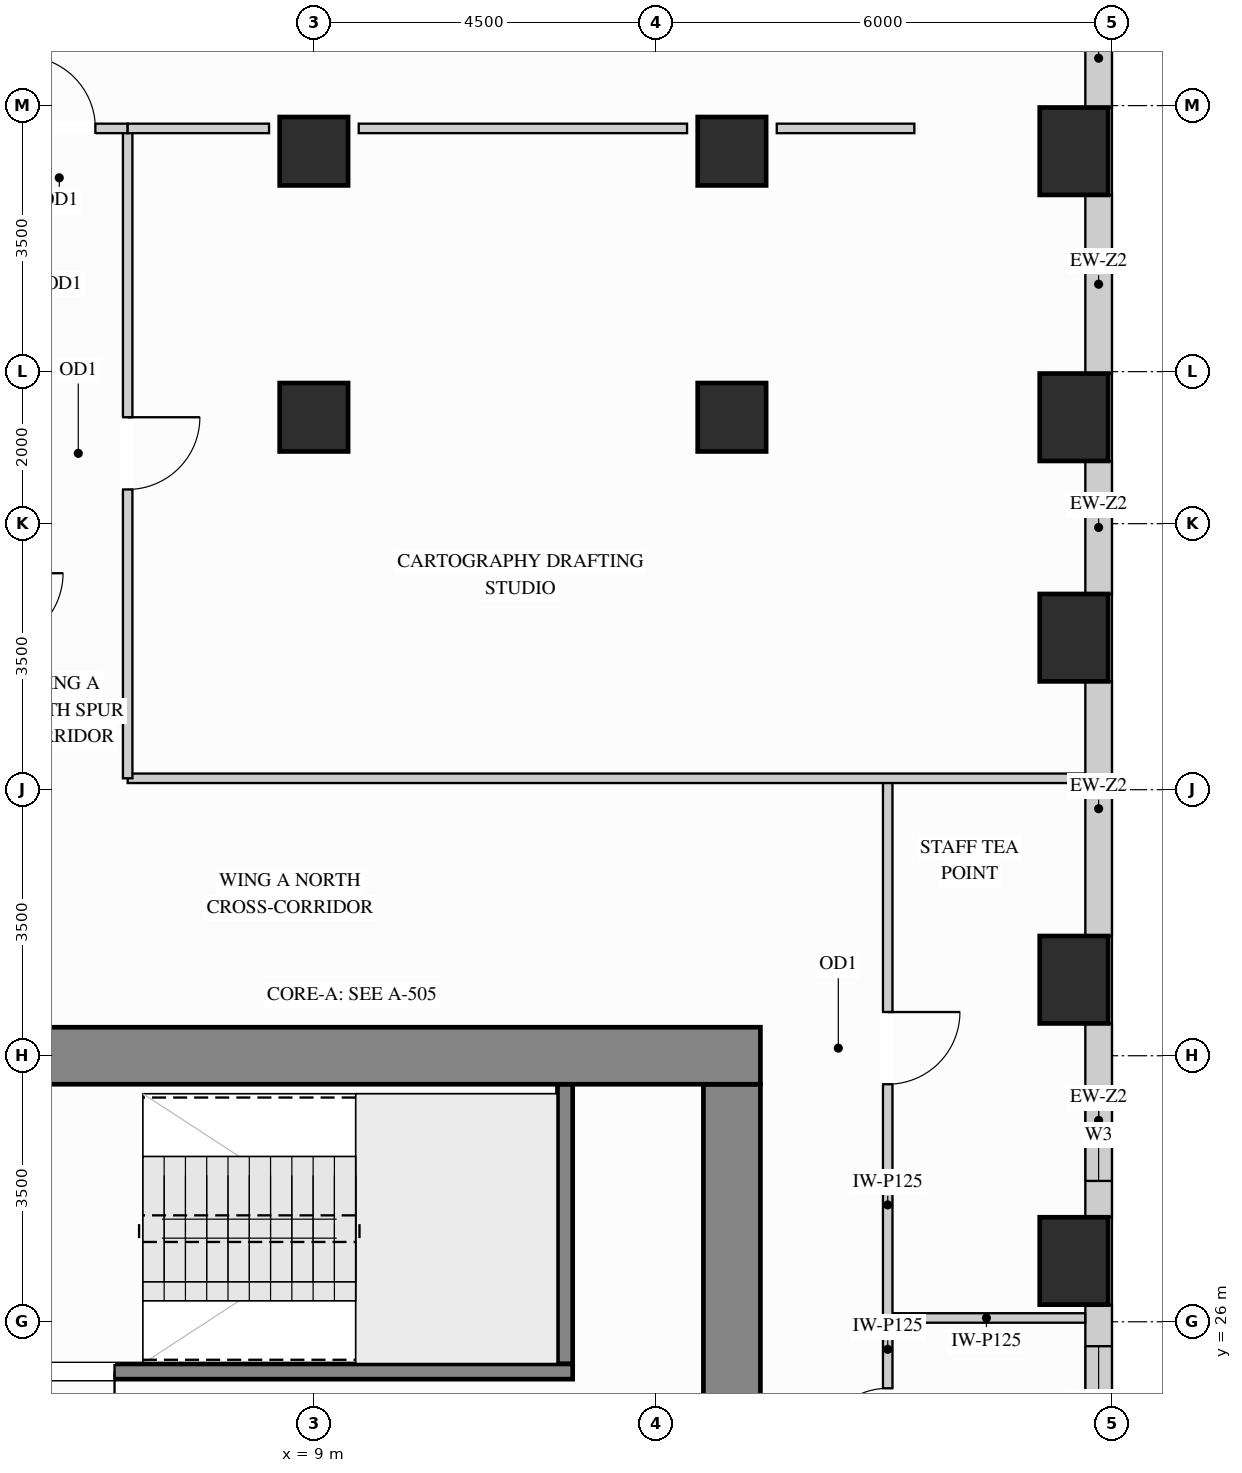
"""IFC4 building model, lengths in metres.
Left out: names, types, materials, properties, quantities, classifications, styles, units other than length and angle.
Written with IfcOpenShell. Run it as: python <this file> out.ifc"""

import sys

from ifc_helpers import new_model, si_unit, direction, frame, frame_2d, origin, origin_2d, place, context, subcontext, project, spatial, rectangle, extrude, source, transform, mapped, element, fill, save


model = new_model("IFC4")
c1 = context("Model", 3, precision=1e-05, world=origin(), true_north=direction((0.0, 1.0)))
c2 = subcontext(c1, "Body", "Model", "MODEL_VIEW")
j1 = project(units=[si_unit("LENGTHUNIT", "METRE"), si_unit("PLANEANGLEUNIT", "RADIAN")], contexts=[c1])
p1 = place(None, origin())
s1 = spatial("IfcSite", under=j1, at=p1, CompositionType="ELEMENT")
p2 = place(p1, origin())
s2 = spatial("IfcBuilding", under=s1, at=p2, CompositionType="ELEMENT")
p3 = place(p2, frame((0.0, 0.0, 135.0)))
s3 = spatial("IfcBuildingStorey", under=s2, at=p3, CompositionType="ELEMENT", Elevation=135.0)
m1 = source(origin(), c2, "Body", "SweptSolid", [
    extrude(rectangle(XDim=0.9, YDim=0.9, at=origin_2d()), origin(), (0.0, 0.0, 1.0), 3.32),
])
for number, where, z_axis, x_axis in (
    (1, (14.5, 37.9, 0.0), (0.0, 0.0, 1.0), (1.0, 0.0, 0.0)),
    (2, (14.5, 41.4, 0.0), (0.0, 0.0, 1.0), (1.0, 0.0, 0.0)),
    (3, (9.0, 37.9, 0.0), (0.0, 0.0, 1.0), (1.0, 0.0, 0.0)),
    (4, (9.0, 41.4, 0.0), (0.0, 0.0, 1.0), (1.0, 0.0, 0.0)),
):
    element("IfcColumn", number, at=place(p3, frame(where, z_axis=z_axis, x_axis=x_axis)), inside=s3, PredefinedType="COLUMN", context=c2, shape_type="MappedRepresentation", body=[
        mapped(m1, transform((0.0, 0.0, 0.0), x_axis=(1.0, 0.0, 0.0), y_axis=(0.0, 1.0, 0.0), z_axis=(0.0, 0.0, 1.0))),
    ])
m2 = source(origin(), c2, "Body", "SweptSolid", [
    extrude(rectangle(XDim=0.9, YDim=1.15, at=origin_2d()), origin(), (0.0, 0.0, 1.0), 3.32),
])
for number, where, z_axis, x_axis in (
    (5, (19.0, 26.8, 0.0), (0.0, 0.0, 1.0), (1.0, 0.0, 0.0)),
    (6, (19.0, 30.5, 0.0), (0.0, 0.0, 1.0), (1.0, 0.0, 0.0)),
    (7, (19.0, 35.0, 0.0), (0.0, 0.0, 1.0), (1.0, 0.0, 0.0)),
    (8, (19.0, 37.9, 0.0), (0.0, 0.0, 1.0), (1.0, 0.0, 0.0)),
    (9, (19.0, 41.4, 0.0), (0.0, 0.0, 1.0), (1.0, 0.0, 0.0)),
):
    element("IfcColumn", number, at=place(p3, frame(where, z_axis=z_axis, x_axis=x_axis)), inside=s3, PredefinedType="COLUMN", context=c2, shape_type="MappedRepresentation", body=[
        mapped(m2, transform((0.0, 0.0, 0.0), x_axis=(1.0, 0.0, 0.0), y_axis=(0.0, 1.0, 0.0), z_axis=(0.0, 0.0, 1.0))),
    ])
m3 = source(origin(), c2, "Body", "SweptSolid", [
    extrude(rectangle(XDim=8.245, YDim=0.75, at=frame_2d((4.123, 0.0))), origin(), (0.0, 0.0, 1.0), 3.32),
])
p4 = place(p3, frame((14.5, 20.88, 0.0), z_axis=(0.0, 0.0, 1.0), x_axis=(0.0, 1.0, 0.0)))
e10 = element("IfcWall", 10, at=p4, inside=s3, PredefinedType="SHEAR", context=c2, shape_type="MappedRepresentation", body=[
    mapped(m3, transform((0.0, 0.0, 0.0), x_axis=(1.0, 0.0, 0.0), y_axis=(0.0, 1.0, 0.0), z_axis=(0.0, 0.0, 1.0))),
])
m4 = source(origin(), c2, "Body", "SweptSolid", [
    extrude(rectangle(XDim=10.75, YDim=0.75, at=frame_2d((5.375, 0.0))), origin(), (0.0, 0.0, 1.0), 3.32),
])
p5 = place(p3, frame((4.125, 29.5, 0.0), z_axis=(0.0, 0.0, 1.0), x_axis=(1.0, 0.0, 0.0)))
e11 = element("IfcWall", 11, at=p5, inside=s3, PredefinedType="SHEAR", context=c2, shape_type="MappedRepresentation", body=[
    mapped(m4, transform((0.0, 0.0, 0.0), x_axis=(1.0, 0.0, 0.0), y_axis=(0.0, 1.0, 0.0), z_axis=(0.0, 0.0, 1.0))),
])
p6 = place(p3, frame((19.325, 23.073, 0.0), z_axis=(0.0, 0.0, 1.0), x_axis=(0.0, 1.0, 0.0)))
e12 = element("IfcWall", 12, at=p6, inside=s3, PredefinedType="SOLIDWALL", context=c2, shape_type="SweptSolid", body=[
    extrude(rectangle(XDim=3.154, YDim=0.35, at=frame_2d((1.577, 0.0))), origin(), (0.0, 0.0, 1.0), 2.459),
])
p7 = place(p6, frame((1.105, 0.0, 0.78)))
e13 = element("IfcOpeningElement", 13, at=p7, cuts=e12, PredefinedType="OPENING", context=c2, shape_type="SweptSolid", body=[
    extrude(rectangle(XDim=1.5, YDim=1.499, at=frame_2d((0.75, 0.75))), frame((0.0, 0.185, 0.0), z_axis=(0.0, -1.0, 0.0), x_axis=(1.0, 0.0, 0.0)), (0.0, 0.0, 1.0), 0.37),
])
p8 = place(p3, frame((19.325, 27.373, 0.0), z_axis=(0.0, 0.0, 1.0), x_axis=(0.0, 1.0, 0.0)))
e14 = element("IfcWall", 14, at=p8, inside=s3, PredefinedType="SOLIDWALL", context=c2, shape_type="SweptSolid", body=[
    extrude(rectangle(XDim=2.554, YDim=0.35, at=frame_2d((1.277, 0.0))), origin(), (0.0, 0.0, 1.0), 2.459),
])
p9 = place(p8, frame((0.48, 0.0, 0.78)))
e15 = element("IfcOpeningElement", 15, at=p9, cuts=e14, PredefinedType="OPENING", context=c2, shape_type="SweptSolid", body=[
    extrude(rectangle(XDim=1.2, YDim=1.499, at=frame_2d((0.6, 0.75))), frame((0.0, 0.185, 0.0), z_axis=(0.0, -1.0, 0.0), x_axis=(1.0, 0.0, 0.0)), (0.0, 0.0, 1.0), 0.37),
])
m5 = source(origin(), c2, "Body", "SweptSolid", [
    extrude(rectangle(XDim=3.354, YDim=0.35, at=frame_2d((1.677, 0.0))), origin(), (0.0, 0.0, 1.0), 2.459),
])
p10 = place(p3, frame((19.325, 31.073, 0.0), z_axis=(0.0, 0.0, 1.0), x_axis=(0.0, 1.0, 0.0)))
e16 = element("IfcWall", 16, at=p10, inside=s3, PredefinedType="SOLIDWALL", context=c2, shape_type="MappedRepresentation", body=[
    mapped(m5, transform((0.0, 0.0, 0.0), x_axis=(1.0, 0.0, 0.0), y_axis=(0.0, 1.0, 0.0), z_axis=(0.0, 0.0, 1.0))),
])
m6 = source(origin(), c2, "Body", "SweptSolid", [
    extrude(rectangle(XDim=1.754, YDim=0.35, at=frame_2d((0.877, 0.0))), origin(), (0.0, 0.0, 1.0), 2.459),
])
p11 = place(p3, frame((19.325, 35.573, 0.0), z_axis=(0.0, 0.0, 1.0), x_axis=(0.0, 1.0, 0.0)))
e17 = element("IfcWall", 17, at=p11, inside=s3, PredefinedType="SOLIDWALL", context=c2, shape_type="MappedRepresentation", body=[
    mapped(m6, transform((0.0, 0.0, 0.0), x_axis=(1.0, 0.0, 0.0), y_axis=(0.0, 1.0, 0.0), z_axis=(0.0, 0.0, 1.0))),
])
m7 = source(origin(), c2, "Body", "SweptSolid", [
    extrude(rectangle(XDim=2.354, YDim=0.35, at=frame_2d((1.177, 0.0))), origin(), (0.0, 0.0, 1.0), 2.459),
])
p12 = place(p3, frame((19.325, 38.473, 0.0), z_axis=(0.0, 0.0, 1.0), x_axis=(0.0, 1.0, 0.0)))
e18 = element("IfcWall", 18, at=p12, inside=s3, PredefinedType="SOLIDWALL", context=c2, shape_type="MappedRepresentation", body=[
    mapped(m7, transform((0.0, 0.0, 0.0), x_axis=(1.0, 0.0, 0.0), y_axis=(0.0, 1.0, 0.0), z_axis=(0.0, 0.0, 1.0))),
])
m8 = source(origin(), c2, "Body", "SweptSolid", [
    extrude(rectangle(XDim=1.179, YDim=0.35, at=frame_2d((0.59, 0.0))), origin(), (0.0, 0.0, 1.0), 3.305),
])
p13 = place(p3, frame((19.325, 41.973, 0.0), z_axis=(0.0, 0.0, 1.0), x_axis=(0.0, 1.0, 0.0)))
e19 = element("IfcWall", 19, at=p13, inside=s3, PredefinedType="SOLIDWALL", context=c2, shape_type="MappedRepresentation", body=[
    mapped(m8, transform((0.0, 0.0, 0.0), x_axis=(1.0, 0.0, 0.0), y_axis=(0.0, 1.0, 0.0), z_axis=(0.0, 0.0, 1.0))),
])
m9 = source(origin(), c2, "Body", "SweptSolid", [
    extrude(rectangle(XDim=2.598, YDim=0.125, at=frame_2d((1.299, 0.0))), origin(), (0.0, 0.0, 1.0), 3.305),
])
p14 = place(p3, frame((16.55, 26.05, 0.0), z_axis=(0.0, 0.0, 1.0), x_axis=(1.0, 0.0, 0.0)))
e20 = element("IfcWall", 20, at=p14, inside=s3, PredefinedType="PARTITIONING", context=c2, shape_type="MappedRepresentation", body=[
    mapped(m9, transform((0.0, 0.0, 0.0), x_axis=(1.0, 0.0, 0.0), y_axis=(0.0, 1.0, 0.0), z_axis=(0.0, 0.0, 1.0))),
])
p15 = place(p3, frame((16.55, 26.05, 0.0), z_axis=(0.0, 0.0, 1.0), x_axis=(0.0, 1.0, 0.0)))
e21 = element("IfcWall", 21, at=p15, inside=s3, PredefinedType="PARTITIONING", context=c2, shape_type="SweptSolid", body=[
    extrude(rectangle(XDim=7.1, YDim=0.125, at=frame_2d((3.55, 0.0))), origin(), (0.0, 0.0, 1.0), 3.305),
])
p16 = place(p15, frame((3.075, 0.0, 0.0)))
e22 = element("IfcOpeningElement", 22, at=p16, cuts=e21, PredefinedType="OPENING", context=c2, shape_type="SweptSolid", body=[
    extrude(rectangle(XDim=0.95, YDim=2.15, at=frame_2d((0.475, 1.075))), frame((0.0, 0.073, 0.0), z_axis=(0.0, -1.0, 0.0), x_axis=(1.0, 0.0, 0.0)), (0.0, 0.0, 1.0), 0.145),
])
p17 = place(p3, frame((16.55, 23.35, 0.0), z_axis=(0.0, 0.0, 1.0), x_axis=(0.0, 1.0, 0.0)))
e23 = element("IfcWall", 23, at=p17, inside=s3, PredefinedType="PARTITIONING", context=c2, shape_type="SweptSolid", body=[
    extrude(rectangle(XDim=2.7, YDim=0.125, at=frame_2d((1.35, 0.0))), origin(), (0.0, 0.0, 1.0), 3.305),
])
p18 = place(p17, frame((0.875, 0.0, 0.0)))
e24 = element("IfcOpeningElement", 24, at=p18, cuts=e23, PredefinedType="OPENING", context=c2, shape_type="SweptSolid", body=[
    extrude(rectangle(XDim=0.9, YDim=2.15, at=frame_2d((0.45, 1.075))), frame((0.0, 0.073, 0.0), z_axis=(0.0, -1.0, 0.0), x_axis=(1.0, 0.0, 0.0)), (0.0, 0.0, 1.0), 0.145),
])
m10 = source(origin(), c2, "Body", "SweptSolid", [
    extrude(rectangle(XDim=12.598, YDim=0.125, at=frame_2d((6.299, 0.0))), origin(), (0.0, 0.0, 1.0), 3.305),
])
p19 = place(p3, frame((6.55, 33.15, 0.0), z_axis=(0.0, 0.0, 1.0), x_axis=(1.0, 0.0, 0.0)))
e25 = element("IfcWall", 25, at=p19, inside=s3, PredefinedType="PARTITIONING", context=c2, shape_type="MappedRepresentation", body=[
    mapped(m10, transform((0.0, 0.0, 0.0), x_axis=(1.0, 0.0, 0.0), y_axis=(0.0, 1.0, 0.0), z_axis=(0.0, 0.0, 1.0))),
])
p20 = place(p3, frame((6.55, 33.15, 0.0), z_axis=(0.0, 0.0, 1.0), x_axis=(0.0, 1.0, 0.0)))
e26 = element("IfcWall", 26, at=p20, inside=s3, PredefinedType="PARTITIONING", context=c2, shape_type="SweptSolid", body=[
    extrude(rectangle(XDim=8.55, YDim=0.125, at=frame_2d((4.275, 0.0))), origin(), (0.0, 0.0, 1.0), 3.305),
])
p21 = place(p20, frame((3.8, 0.0, 0.0)))
e27 = element("IfcOpeningElement", 27, at=p21, cuts=e26, PredefinedType="OPENING", context=c2, shape_type="SweptSolid", body=[
    extrude(rectangle(XDim=0.95, YDim=2.15, at=frame_2d((0.475, 1.075))), frame((0.0, 0.073, 0.0), z_axis=(0.0, -1.0, 0.0), x_axis=(1.0, 0.0, 0.0)), (0.0, 0.0, 1.0), 0.145),
])
p22 = place(p3, frame((4.75, 41.7, 0.0), z_axis=(0.0, 0.0, 1.0), x_axis=(1.0, 0.0, 0.0)))
e28 = element("IfcWall", 28, at=p22, inside=s3, PredefinedType="PARTITIONING", context=c2, shape_type="SweptSolid", body=[
    extrude(rectangle(XDim=1.8, YDim=0.125, at=frame_2d((0.9, 0.0))), origin(), (0.0, 0.0, 1.0), 3.305),
])
p23 = place(p22, frame((0.425, 0.0, 0.0)))
e29 = element("IfcOpeningElement", 29, at=p23, cuts=e28, PredefinedType="OPENING", context=c2, shape_type="SweptSolid", body=[
    extrude(rectangle(XDim=0.95, YDim=2.15, at=frame_2d((0.475, 1.075))), frame((0.0, 0.073, 0.0), z_axis=(0.0, -1.0, 0.0), x_axis=(1.0, 0.0, 0.0)), (0.0, 0.0, 1.0), 0.145),
])
m11 = source(origin(), c2, "Body", "SweptSolid", [
    extrude(rectangle(XDim=1.86, YDim=0.125, at=frame_2d((0.93, 0.0))), origin(), (0.0, 0.0, 1.0), 3.305),
])
p24 = place(p3, frame((6.55, 41.7, 0.0), z_axis=(0.0, 0.0, 1.0), x_axis=(1.0, 0.0, 0.0)))
e30 = element("IfcWall", 30, at=p24, inside=s3, PredefinedType="PARTITIONING", context=c2, shape_type="MappedRepresentation", body=[
    mapped(m11, transform((0.0, 0.0, 0.0), x_axis=(1.0, 0.0, 0.0), y_axis=(0.0, 1.0, 0.0), z_axis=(0.0, 0.0, 1.0))),
])
m12 = source(origin(), c2, "Body", "SweptSolid", [
    extrude(rectangle(XDim=4.32, YDim=0.125, at=frame_2d((2.16, 0.0))), origin(), (0.0, 0.0, 1.0), 3.305),
])
p25 = place(p3, frame((9.59, 41.7, 0.0), z_axis=(0.0, 0.0, 1.0), x_axis=(1.0, 0.0, 0.0)))
e31 = element("IfcWall", 31, at=p25, inside=s3, PredefinedType="PARTITIONING", context=c2, shape_type="MappedRepresentation", body=[
    mapped(m12, transform((0.0, 0.0, 0.0), x_axis=(1.0, 0.0, 0.0), y_axis=(0.0, 1.0, 0.0), z_axis=(0.0, 0.0, 1.0))),
])
m13 = source(origin(), c2, "Body", "SweptSolid", [
    extrude(rectangle(XDim=1.81, YDim=0.125, at=frame_2d((0.905, 0.0))), origin(), (0.0, 0.0, 1.0), 3.305),
])
p26 = place(p3, frame((15.09, 41.7, 0.0), z_axis=(0.0, 0.0, 1.0), x_axis=(1.0, 0.0, 0.0)))
e32 = element("IfcWall", 32, at=p26, inside=s3, PredefinedType="PARTITIONING", context=c2, shape_type="MappedRepresentation", body=[
    mapped(m13, transform((0.0, 0.0, 0.0), x_axis=(1.0, 0.0, 0.0), y_axis=(0.0, 1.0, 0.0), z_axis=(0.0, 0.0, 1.0))),
])
m14 = source(origin(), c2, "Body", "SweptSolid", [
    extrude(rectangle(XDim=3.678, YDim=0.2, at=frame_2d((1.839, 0.0))), origin(), (0.0, 0.0, 1.0), 3.32),
])
p27 = place(p3, frame((12.305, 25.445, 0.0), z_axis=(0.0, 0.0, 1.0), x_axis=(0.0, 1.0, 0.0)))
e33 = element("IfcWall", 33, at=p27, inside=s3, PredefinedType="SHEAR", context=c2, shape_type="MappedRepresentation", body=[
    mapped(m14, transform((0.0, 0.0, 0.0), x_axis=(1.0, 0.0, 0.0), y_axis=(0.0, 1.0, 0.0), z_axis=(0.0, 0.0, 1.0))),
])
p28 = place(p3, frame((4.877, 25.345, 0.0), z_axis=(0.0, 0.0, 1.0), x_axis=(1.0, 0.0, 0.0)))
e34 = element("IfcWall", 34, at=p28, inside=s3, PredefinedType="SHEAR", context=c2, shape_type="SweptSolid", body=[
    extrude(rectangle(XDim=7.528, YDim=0.2, at=frame_2d((3.764, 0.0))), origin(), (0.0, 0.0, 1.0), 3.32),
])
p29 = place(p28, frame((0.4, 0.0, 0.0)))
e35 = element("IfcOpeningElement", 35, at=p29, cuts=e34, PredefinedType="OPENING", context=c2, shape_type="SweptSolid", body=[
    extrude(rectangle(XDim=1.1, YDim=2.15, at=frame_2d((0.55, 1.075))), frame((0.0, 0.11, 0.0), z_axis=(0.0, -1.0, 0.0), x_axis=(1.0, 0.0, 0.0)), (0.0, 0.0, 1.0), 0.22),
])
m15 = source(origin(), c2, "Body", "SweptSolid", [
    extrude(rectangle(XDim=0.95, YDim=2.15, at=frame_2d((0.475, 1.075))), frame((0.0, 0.025, 0.0), z_axis=(0.0, -1.0, 0.0), x_axis=(1.0, 0.0, 0.0)), (0.0, 0.0, 1.0), 0.05),
])
p30 = place(p16, origin())
e36 = element("IfcDoor", 36, at=p30, inside=s3, OperationType="SINGLE_SWING_RIGHT", PredefinedType="DOOR", context=c2, shape_type="MappedRepresentation", body=[
    mapped(m15, transform((0.0, 0.0, 0.0), x_axis=(1.0, 0.0, 0.0), y_axis=(0.0, 1.0, 0.0), z_axis=(0.0, 0.0, 1.0))),
])
fill(e22, e36)
p31 = place(p21, origin())
e37 = element("IfcDoor", 37, at=p31, inside=s3, OperationType="SINGLE_SWING_RIGHT", PredefinedType="DOOR", context=c2, shape_type="MappedRepresentation", body=[
    mapped(m15, transform((0.0, 0.0, 0.0), x_axis=(1.0, 0.0, 0.0), y_axis=(0.0, 1.0, 0.0), z_axis=(0.0, 0.0, 1.0))),
])
fill(e27, e37)
p32 = place(p23, origin())
e38 = element("IfcDoor", 38, at=p32, inside=s3, OperationType="SINGLE_SWING_LEFT", PredefinedType="DOOR", context=c2, shape_type="MappedRepresentation", body=[
    mapped(m15, transform((0.0, 0.0, 0.0), x_axis=(1.0, 0.0, 0.0), y_axis=(0.0, 1.0, 0.0), z_axis=(0.0, 0.0, 1.0))),
])
fill(e29, e38)
m16 = source(origin(), c2, "Body", "SweptSolid", [
    extrude(rectangle(XDim=1.1, YDim=2.15, at=frame_2d((0.55, 1.075))), frame((0.0, 0.025, 0.0), z_axis=(0.0, -1.0, 0.0), x_axis=(1.0, 0.0, 0.0)), (0.0, 0.0, 1.0), 0.05),
])
p33 = place(p29, origin())
e39 = element("IfcDoor", 39, at=p33, inside=s3, OperationType="SINGLE_SWING_RIGHT", PredefinedType="DOOR", context=c2, shape_type="MappedRepresentation", body=[
    mapped(m16, transform((0.0, 0.0, 0.0), x_axis=(1.0, 0.0, 0.0), y_axis=(0.0, 1.0, 0.0), z_axis=(0.0, 0.0, 1.0))),
])
fill(e35, e39)
m17 = source(origin(), c2, "Body", "SweptSolid", [
    extrude(rectangle(XDim=0.9, YDim=2.15, at=frame_2d((0.45, 1.075))), frame((0.0, 0.025, 0.0), z_axis=(0.0, -1.0, 0.0), x_axis=(1.0, 0.0, 0.0)), (0.0, 0.0, 1.0), 0.05),
])
p34 = place(p18, origin())
e40 = element("IfcDoor", 40, at=p34, inside=s3, OperationType="SINGLE_SWING_LEFT", PredefinedType="DOOR", context=c2, shape_type="MappedRepresentation", body=[
    mapped(m17, transform((0.0, 0.0, 0.0), x_axis=(1.0, 0.0, 0.0), y_axis=(0.0, 1.0, 0.0), z_axis=(0.0, 0.0, 1.0))),
])
fill(e24, e40)
m18 = source(origin(), c2, "Body", "SweptSolid", [
    extrude(rectangle(XDim=1.2, YDim=1.499, at=frame_2d((0.6, 0.75))), frame((0.0, 0.03, 0.0), z_axis=(0.0, -1.0, 0.0), x_axis=(1.0, 0.0, 0.0)), (0.0, 0.0, 1.0), 0.06),
])
p35 = place(p9, origin())
e41 = element("IfcWindow", 41, at=p35, inside=s3, PartitioningType="SINGLE_PANEL", PredefinedType="WINDOW", context=c2, shape_type="MappedRepresentation", body=[
    mapped(m18, transform((0.0, 0.0, 0.0), x_axis=(1.0, 0.0, 0.0), y_axis=(0.0, 1.0, 0.0), z_axis=(0.0, 0.0, 1.0))),
])
fill(e15, e41)
m19 = source(origin(), c2, "Body", "SweptSolid", [
    extrude(rectangle(XDim=1.5, YDim=1.499, at=frame_2d((0.75, 0.75))), frame((0.0, 0.03, 0.0), z_axis=(0.0, -1.0, 0.0), x_axis=(1.0, 0.0, 0.0)), (0.0, 0.0, 1.0), 0.06),
])
p36 = place(p7, origin())
e42 = element("IfcWindow", 42, at=p36, inside=s3, PartitioningType="SINGLE_PANEL", PredefinedType="WINDOW", context=c2, shape_type="MappedRepresentation", body=[
    mapped(m19, transform((0.0, 0.0, 0.0), x_axis=(1.0, 0.0, 0.0), y_axis=(0.0, 1.0, 0.0), z_axis=(0.0, 0.0, 1.0))),
])
fill(e13, e42)
save(model, sys.argv[1])
